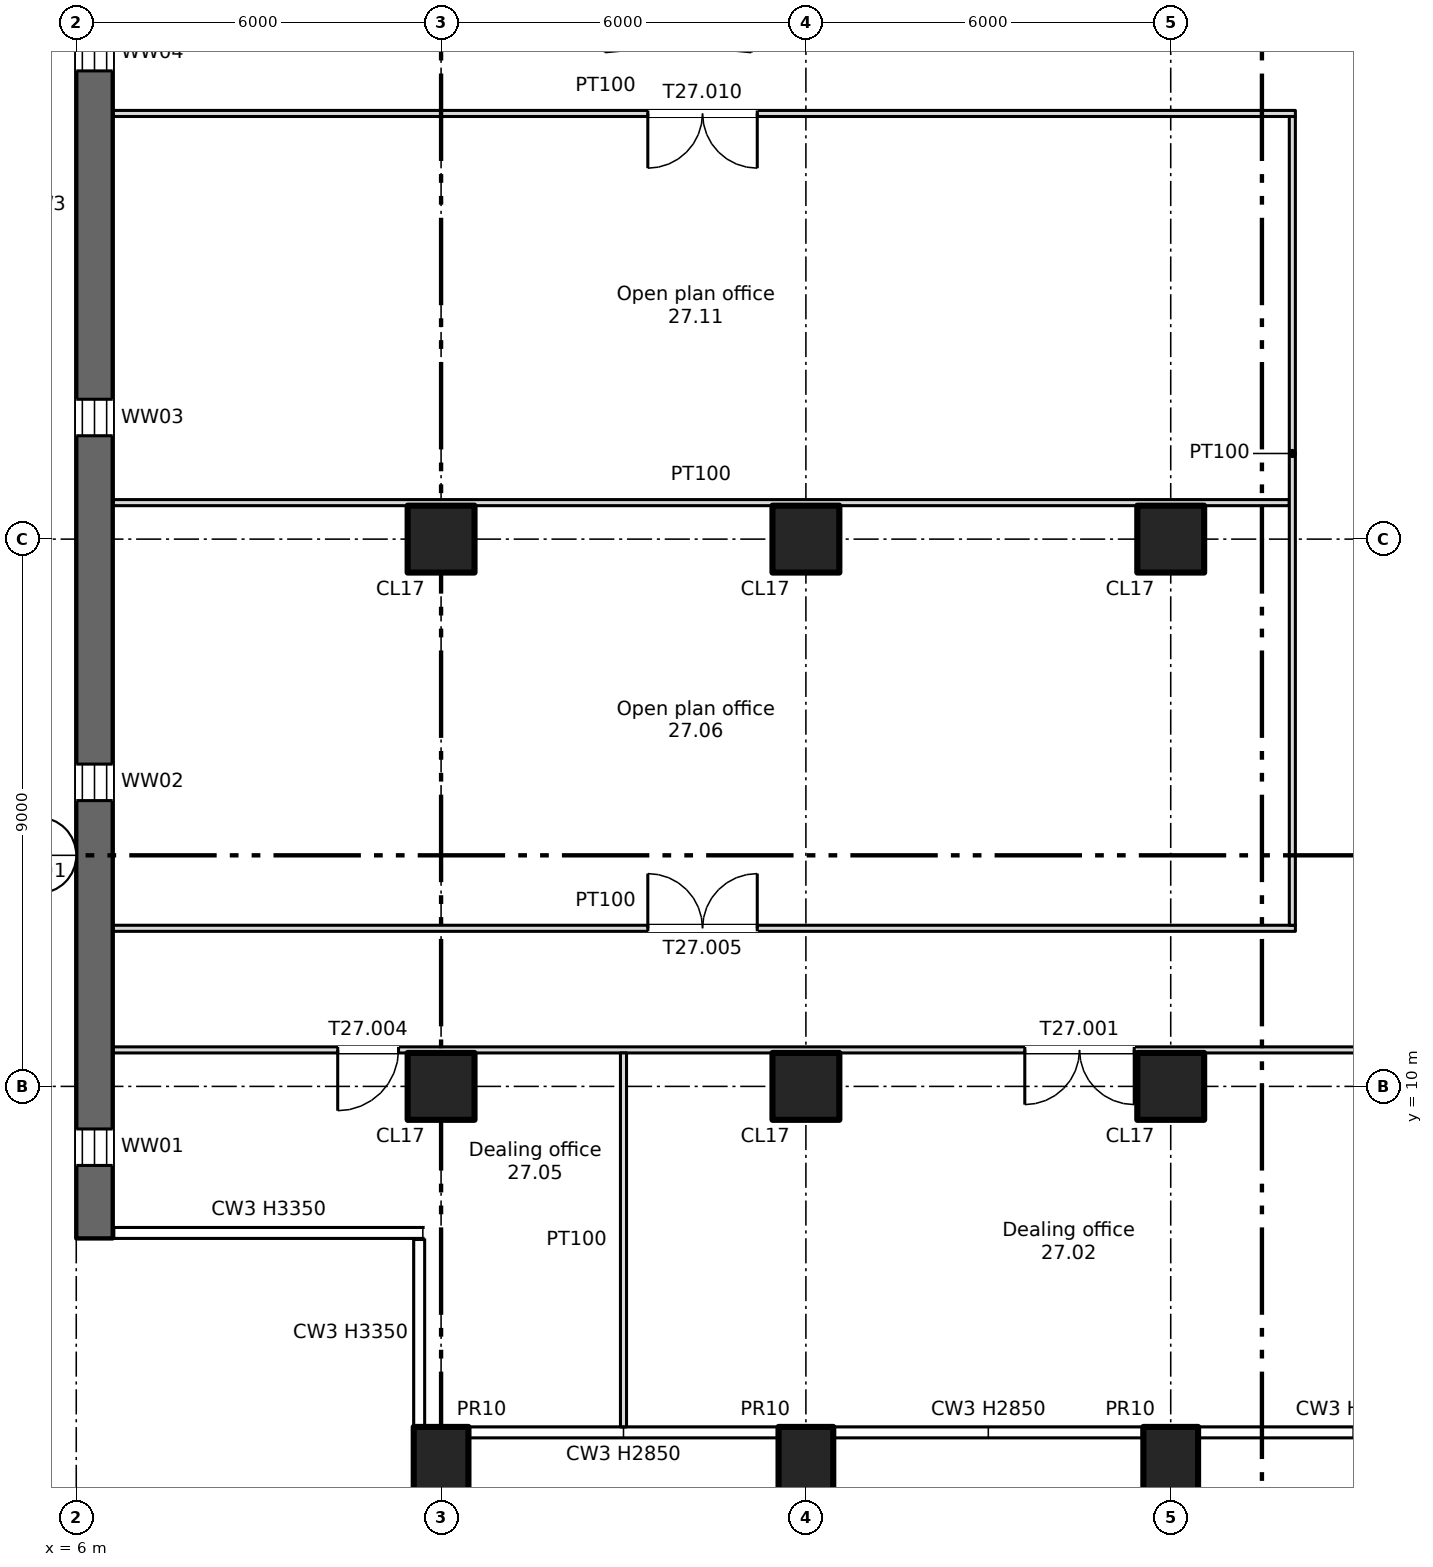
"""IFC4 building model, lengths in metres.
Left out: names, types, materials, properties, quantities, classifications, styles, units other than length and angle.
Written with IfcOpenShell. Run it as: python <this file> out.ifc"""

import sys

from ifc_helpers import new_model, si_unit, direction, frame, frame_2d, origin, origin_2d, place, context, subcontext, project, spatial, rectangle, extrude, element, fill, save


model = new_model("IFC4")
c1 = context("Model", 3, precision=1e-05, world=origin(), true_north=direction((0.0, 1.0)))
c2 = subcontext(c1, "Body", "Model", "MODEL_VIEW")
j1 = project(units=[si_unit("LENGTHUNIT", "METRE"), si_unit("PLANEANGLEUNIT", "RADIAN")], contexts=[c1])
p1 = place(None, origin())
s1 = spatial("IfcSite", under=j1, at=p1, CompositionType="ELEMENT")
p2 = place(p1, origin())
s2 = spatial("IfcBuilding", under=s1, at=p2, CompositionType="ELEMENT")
p3 = place(p2, frame((0.0, 0.0, 189.25)))
s3 = spatial("IfcBuildingStorey", under=s2, at=p3, CompositionType="ELEMENT", Elevation=189.25)
for number, where, z_axis, x_axis in (
    (1, (12.0, 3.7, -0.4), (0.0, 0.0, 1.0), (1.0, 0.0, 0.0)),
    (2, (18.0, 3.7, -0.4), (0.0, 0.0, 1.0), (1.0, 0.0, 0.0)),
    (3, (24.0, 3.7, -0.4), (0.0, 0.0, 1.0), (1.0, 0.0, 0.0)),
):
    element("IfcColumn", number, at=place(p3, frame(where, z_axis=z_axis, x_axis=x_axis)), inside=s3, PredefinedType="COLUMN", context=c2, shape_type="SweptSolid", body=[
        extrude(rectangle(XDim=0.9, YDim=1.4, at=origin_2d()), origin(), (0.0, 0.0, 1.0), 3.75),
    ])
for number, where, z_axis, x_axis in (
    (4, (12.0, 10.0, 0.0), (0.0, 0.0, 1.0), (1.0, 0.0, 0.0)),
    (5, (12.0, 19.0, 0.0), (0.0, 0.0, 1.0), (1.0, 0.0, 0.0)),
    (6, (18.0, 10.0, 0.0), (0.0, 0.0, 1.0), (1.0, 0.0, 0.0)),
    (7, (18.0, 19.0, 0.0), (0.0, 0.0, 1.0), (1.0, 0.0, 0.0)),
    (8, (24.0, 10.0, 0.0), (0.0, 0.0, 1.0), (1.0, 0.0, 0.0)),
    (9, (24.0, 19.0, 0.0), (0.0, 0.0, 1.0), (1.0, 0.0, 0.0)),
):
    element("IfcColumn", number, at=place(p3, frame(where, z_axis=z_axis, x_axis=x_axis)), inside=s3, PredefinedType="COLUMN", context=c2, shape_type="SweptSolid", body=[
        extrude(rectangle(XDim=1.1, YDim=1.1, at=origin_2d()), origin(), (0.0, 0.0, 1.0), 3.35),
    ])
p4 = place(p3, frame((6.3, 7.5, 0.0), z_axis=(0.0, 0.0, 1.0), x_axis=(0.0, 1.0, 0.0)))
e10 = element("IfcWall", 10, at=p4, inside=s3, PredefinedType="SHEAR", context=c2, shape_type="SweptSolid", body=[
    extrude(rectangle(XDim=34.0, YDim=0.6, at=frame_2d((17.0, 0.0))), origin(), (0.0, 0.0, 1.0), 3.35),
])
p5 = place(p4, frame((1.2, 0.0, 0.6)))
e11 = element("IfcOpeningElement", 11, at=p5, cuts=e10, PredefinedType="OPENING", context=c2, shape_type="SweptSolid", body=[
    extrude(rectangle(XDim=0.6, YDim=2.4, at=frame_2d((0.3, 1.2))), frame((0.0, 0.31, 0.0), z_axis=(0.0, -1.0, 0.0), x_axis=(1.0, 0.0, 0.0)), (0.0, 0.0, 1.0), 0.62),
])
p6 = place(p4, frame((7.2, 0.0, 0.6)))
e12 = element("IfcOpeningElement", 12, at=p6, cuts=e10, PredefinedType="OPENING", context=c2, shape_type="SweptSolid", body=[
    extrude(rectangle(XDim=0.6, YDim=2.4, at=frame_2d((0.3, 1.2))), frame((0.0, 0.31, 0.0), z_axis=(0.0, -1.0, 0.0), x_axis=(1.0, 0.0, 0.0)), (0.0, 0.0, 1.0), 0.62),
])
p7 = place(p4, frame((13.2, 0.0, 0.6)))
e13 = element("IfcOpeningElement", 13, at=p7, cuts=e10, PredefinedType="OPENING", context=c2, shape_type="SweptSolid", body=[
    extrude(rectangle(XDim=0.6, YDim=2.4, at=frame_2d((0.3, 1.2))), frame((0.0, 0.31, 0.0), z_axis=(0.0, -1.0, 0.0), x_axis=(1.0, 0.0, 0.0)), (0.0, 0.0, 1.0), 0.62),
])
p8 = place(p4, frame((19.2, 0.0, 0.6)))
e14 = element("IfcOpeningElement", 14, at=p8, cuts=e10, PredefinedType="OPENING", context=c2, shape_type="SweptSolid", body=[
    extrude(rectangle(XDim=0.6, YDim=2.4, at=frame_2d((0.3, 1.2))), frame((0.0, 0.31, 0.0), z_axis=(0.0, -1.0, 0.0), x_axis=(1.0, 0.0, 0.0)), (0.0, 0.0, 1.0), 0.62),
])
p9 = place(p3, frame((6.6, 10.6, 0.0), z_axis=(0.0, 0.0, 1.0), x_axis=(1.0, 0.0, 0.0)))
e15 = element("IfcWall", 15, at=p9, inside=s3, PredefinedType="PARTITIONING", context=c2, shape_type="SweptSolid", body=[
    extrude(rectangle(XDim=64.8, YDim=0.1, at=frame_2d((32.4, 0.0))), origin(), (0.0, 0.0, 1.0), 3.35),
])
p10 = place(p9, frame((15.0, 0.0, 0.0)))
e16 = element("IfcOpeningElement", 16, at=p10, cuts=e15, PredefinedType="OPENING", context=c2, shape_type="SweptSolid", body=[
    extrude(rectangle(XDim=1.8, YDim=2.1, at=frame_2d((0.9, 1.05))), frame((0.0, 0.06, 0.0), z_axis=(0.0, -1.0, 0.0), x_axis=(1.0, 0.0, 0.0)), (0.0, 0.0, 1.0), 0.12),
])
p11 = place(p9, frame((30.0, 0.0, 0.0)))
e17 = element("IfcOpeningElement", 17, at=p11, cuts=e15, PredefinedType="OPENING", context=c2, shape_type="SweptSolid", body=[
    extrude(rectangle(XDim=1.8, YDim=2.1, at=frame_2d((0.9, 1.05))), frame((0.0, 0.06, 0.0), z_axis=(0.0, -1.0, 0.0), x_axis=(1.0, 0.0, 0.0)), (0.0, 0.0, 1.0), 0.12),
])
p12 = place(p9, frame((50.7, 0.0, 0.0)))
e18 = element("IfcOpeningElement", 18, at=p12, cuts=e15, PredefinedType="OPENING", context=c2, shape_type="SweptSolid", body=[
    extrude(rectangle(XDim=1.8, YDim=2.1, at=frame_2d((0.9, 1.05))), frame((0.0, 0.06, 0.0), z_axis=(0.0, -1.0, 0.0), x_axis=(1.0, 0.0, 0.0)), (0.0, 0.0, 1.0), 0.12),
])
p13 = place(p9, frame((3.7, 0.0, 0.0)))
e19 = element("IfcOpeningElement", 19, at=p13, cuts=e15, PredefinedType="OPENING", context=c2, shape_type="SweptSolid", body=[
    extrude(rectangle(XDim=1.0, YDim=2.1, at=frame_2d((0.5, 1.05))), frame((0.0, 0.06, 0.0), z_axis=(0.0, -1.0, 0.0), x_axis=(1.0, 0.0, 0.0)), (0.0, 0.0, 1.0), 0.12),
])
p14 = place(p3, frame((6.6, 12.6, 0.0), z_axis=(0.0, 0.0, 1.0), x_axis=(1.0, 0.0, 0.0)))
e20 = element("IfcWall", 20, at=p14, inside=s3, PredefinedType="PARTITIONING", context=c2, shape_type="SweptSolid", body=[
    extrude(rectangle(XDim=19.45, YDim=0.1, at=frame_2d((9.725, 0.0))), origin(), (0.0, 0.0, 1.0), 3.35),
])
p15 = place(p14, frame((8.8, 0.0, 0.0)))
e21 = element("IfcOpeningElement", 21, at=p15, cuts=e20, PredefinedType="OPENING", context=c2, shape_type="SweptSolid", body=[
    extrude(rectangle(XDim=1.8, YDim=2.1, at=frame_2d((0.9, 1.05))), frame((0.0, 0.06, 0.0), z_axis=(0.0, -1.0, 0.0), x_axis=(1.0, 0.0, 0.0)), (0.0, 0.0, 1.0), 0.12),
])
p16 = place(p3, frame((6.6, 19.6, 0.0), z_axis=(0.0, 0.0, 1.0), x_axis=(1.0, 0.0, 0.0)))
e22 = element("IfcWall", 22, at=p16, inside=s3, PredefinedType="PARTITIONING", context=c2, shape_type="SweptSolid", body=[
    extrude(rectangle(XDim=19.35, YDim=0.1, at=frame_2d((9.675, 0.0))), origin(), (0.0, 0.0, 1.0), 3.35),
])
p17 = place(p3, frame((6.6, 26.0, 0.0), z_axis=(0.0, 0.0, 1.0), x_axis=(1.0, 0.0, 0.0)))
e23 = element("IfcWall", 23, at=p17, inside=s3, PredefinedType="PARTITIONING", context=c2, shape_type="SweptSolid", body=[
    extrude(rectangle(XDim=19.45, YDim=0.1, at=frame_2d((9.725, 0.0))), origin(), (0.0, 0.0, 1.0), 3.35),
])
p18 = place(p17, frame((8.8, 0.0, 0.0)))
e24 = element("IfcOpeningElement", 24, at=p18, cuts=e23, PredefinedType="OPENING", context=c2, shape_type="SweptSolid", body=[
    extrude(rectangle(XDim=1.8, YDim=2.1, at=frame_2d((0.9, 1.05))), frame((0.0, 0.06, 0.0), z_axis=(0.0, -1.0, 0.0), x_axis=(1.0, 0.0, 0.0)), (0.0, 0.0, 1.0), 0.12),
])
p19 = place(p3, frame((15.0, 4.4, 0.0), z_axis=(0.0, 0.0, 1.0), x_axis=(0.0, 1.0, 0.0)))
e25 = element("IfcWall", 25, at=p19, inside=s3, PredefinedType="PARTITIONING", context=c2, shape_type="SweptSolid", body=[
    extrude(rectangle(XDim=6.15, YDim=0.1, at=frame_2d((3.075, 0.0))), origin(), (0.0, 0.0, 1.0), 3.35),
])
p20 = place(p3, frame((26.0, 12.65, 0.0), z_axis=(0.0, 0.0, 1.0), x_axis=(0.0, 1.0, 0.0)))
e26 = element("IfcWall", 26, at=p20, inside=s3, PredefinedType="PARTITIONING", context=c2, shape_type="SweptSolid", body=[
    extrude(rectangle(XDim=13.3, YDim=0.1, at=frame_2d((6.65, 0.0))), origin(), (0.0, 0.0, 1.0), 3.35),
])
p21 = place(p5, origin())
e27 = element("IfcWindow", 27, at=p21, inside=s3, PartitioningType="SINGLE_PANEL", PredefinedType="WINDOW", context=c2, shape_type="SweptSolid", body=[
    extrude(rectangle(XDim=0.6, YDim=2.4, at=frame_2d((0.3, 1.2))), frame((0.0, 0.03, 0.0), z_axis=(0.0, -1.0, 0.0), x_axis=(1.0, 0.0, 0.0)), (0.0, 0.0, 1.0), 0.06),
])
fill(e11, e27)
p22 = place(p6, origin())
e28 = element("IfcWindow", 28, at=p22, inside=s3, PartitioningType="SINGLE_PANEL", PredefinedType="WINDOW", context=c2, shape_type="SweptSolid", body=[
    extrude(rectangle(XDim=0.6, YDim=2.4, at=frame_2d((0.3, 1.2))), frame((0.0, 0.03, 0.0), z_axis=(0.0, -1.0, 0.0), x_axis=(1.0, 0.0, 0.0)), (0.0, 0.0, 1.0), 0.06),
])
fill(e12, e28)
p23 = place(p7, origin())
e29 = element("IfcWindow", 29, at=p23, inside=s3, PartitioningType="SINGLE_PANEL", PredefinedType="WINDOW", context=c2, shape_type="SweptSolid", body=[
    extrude(rectangle(XDim=0.6, YDim=2.4, at=frame_2d((0.3, 1.2))), frame((0.0, 0.03, 0.0), z_axis=(0.0, -1.0, 0.0), x_axis=(1.0, 0.0, 0.0)), (0.0, 0.0, 1.0), 0.06),
])
fill(e13, e29)
p24 = place(p8, origin())
e30 = element("IfcWindow", 30, at=p24, inside=s3, PartitioningType="SINGLE_PANEL", PredefinedType="WINDOW", context=c2, shape_type="SweptSolid", body=[
    extrude(rectangle(XDim=0.6, YDim=2.4, at=frame_2d((0.3, 1.2))), frame((0.0, 0.03, 0.0), z_axis=(0.0, -1.0, 0.0), x_axis=(1.0, 0.0, 0.0)), (0.0, 0.0, 1.0), 0.06),
])
fill(e14, e30)
p25 = place(p10, origin())
e31 = element("IfcDoor", 31, at=p25, inside=s3, OperationType="DOUBLE_DOOR_SINGLE_SWING", PredefinedType="DOOR", context=c2, shape_type="SweptSolid", body=[
    extrude(rectangle(XDim=1.8, YDim=2.1, at=frame_2d((0.9, 1.05))), frame((0.0, 0.025, 0.0), z_axis=(0.0, -1.0, 0.0), x_axis=(1.0, 0.0, 0.0)), (0.0, 0.0, 1.0), 0.05),
])
fill(e16, e31)
p26 = place(p13, origin())
e32 = element("IfcDoor", 32, at=p26, inside=s3, OperationType="SINGLE_SWING_LEFT", PredefinedType="DOOR", context=c2, shape_type="SweptSolid", body=[
    extrude(rectangle(XDim=1.0, YDim=2.1, at=frame_2d((0.5, 1.05))), frame((0.0, 0.025, 0.0), z_axis=(0.0, -1.0, 0.0), x_axis=(1.0, 0.0, 0.0)), (0.0, 0.0, 1.0), 0.05),
])
fill(e19, e32)
p27 = place(p15, origin())
e33 = element("IfcDoor", 33, at=p27, inside=s3, OperationType="DOUBLE_DOOR_SINGLE_SWING", PredefinedType="DOOR", context=c2, shape_type="SweptSolid", body=[
    extrude(rectangle(XDim=1.8, YDim=2.1, at=frame_2d((0.9, 1.05))), frame((0.0, 0.025, 0.0), z_axis=(0.0, -1.0, 0.0), x_axis=(1.0, 0.0, 0.0)), (0.0, 0.0, 1.0), 0.05),
])
fill(e21, e33)
p28 = place(p18, origin())
e34 = element("IfcDoor", 34, at=p28, inside=s3, OperationType="DOUBLE_DOOR_SINGLE_SWING", PredefinedType="DOOR", context=c2, shape_type="SweptSolid", body=[
    extrude(rectangle(XDim=1.8, YDim=2.1, at=frame_2d((0.9, 1.05))), frame((0.0, 0.025, 0.0), z_axis=(0.0, -1.0, 0.0), x_axis=(1.0, 0.0, 0.0)), (0.0, 0.0, 1.0), 0.05),
])
fill(e24, e34)
save(model, sys.argv[1])
